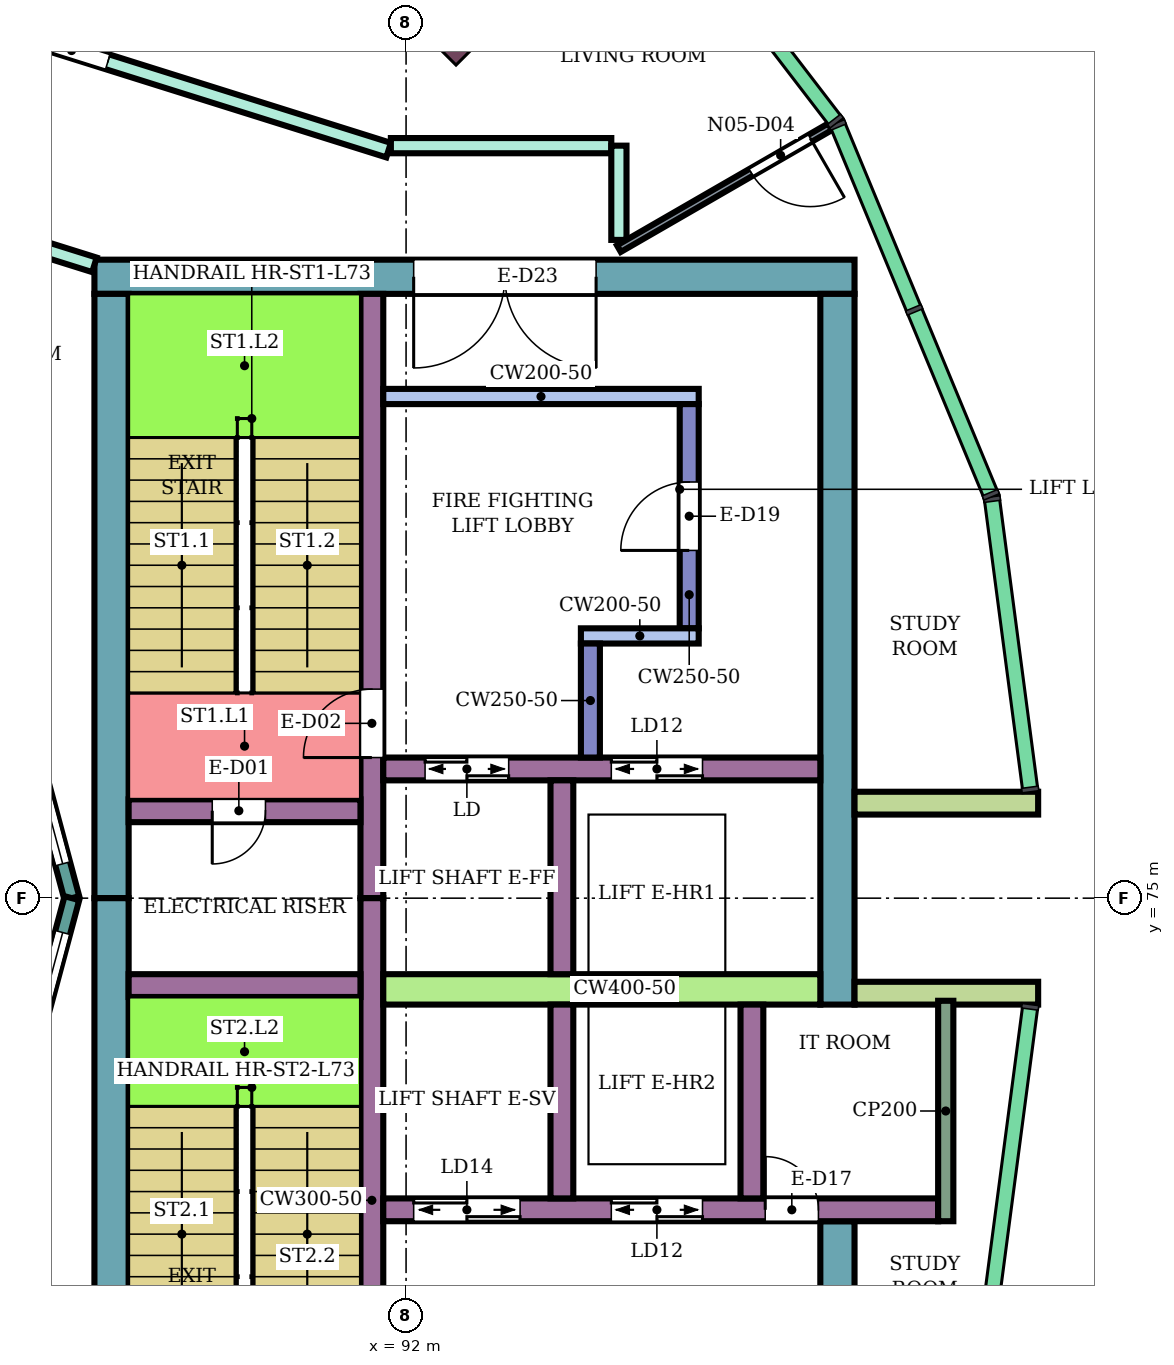
"""IFC4 building model, lengths in metres.
Left out: names, types, materials, properties, quantities, classifications, styles, units other than length and angle.
Written with IfcOpenShell. Run it as: python <this file> out.ifc"""

import sys

from ifc_helpers import new_model, si_unit, direction, frame, frame_2d, origin, origin_2d, place, context, subcontext, project, spatial, rectangle, extrude, element, fill, save


model = new_model("IFC4")
c1 = context("Model", 3, precision=1e-05, world=origin(), true_north=direction((0.0, 1.0)))
c2 = subcontext(c1, "Body", "Model", "MODEL_VIEW")
j1 = project(units=[si_unit("LENGTHUNIT", "METRE"), si_unit("PLANEANGLEUNIT", "RADIAN")], contexts=[c1])
p1 = place(None, origin())
s1 = spatial("IfcSite", under=j1, at=p1, CompositionType="ELEMENT")
p2 = place(p1, origin())
s2 = spatial("IfcBuilding", under=s1, at=p2, CompositionType="ELEMENT")
p3 = place(p2, frame((0.0, 0.0, 319.3)))
s3 = spatial("IfcBuildingStorey", under=s2, at=p3, CompositionType="ELEMENT", Elevation=319.3)
p4 = place(p3, frame((92.233, 87.233, 0.0), z_axis=(0.0, 0.0, 1.0), x_axis=(0.707106781187, 0.707106781187, 0.0)))
e1 = element("IfcColumn", 1, at=p4, inside=s3, PredefinedType="COLUMN", context=c2, shape_type="SweptSolid", body=[
    extrude(rectangle(XDim=1.2, YDim=2.4, at=origin_2d()), origin(), (0.0, 0.0, 1.0), 4.4),
])
p5 = place(p3, frame((87.9, 83.175, 0.0), z_axis=(0.0, 0.0, 1.0), x_axis=(1.0, 0.0, 0.0)))
e2 = element("IfcWall", 2, at=p5, inside=s3, PredefinedType="SHEAR", context=c2, shape_type="SweptSolid", body=[
    extrude(rectangle(XDim=10.0, YDim=0.45, at=frame_2d((5.0, 0.0))), origin(), (0.0, 0.0, 1.0), 4.08),
])
p6 = place(p5, frame((4.2, 0.0, 0.0)))
e3 = element("IfcOpeningElement", 3, at=p6, cuts=e2, PredefinedType="OPENING", context=c2, shape_type="SweptSolid", body=[
    extrude(rectangle(XDim=2.4, YDim=2.4, at=frame_2d((1.2, 1.2))), frame((0.0, 0.235, 0.0), z_axis=(0.0, -1.0, 0.0), x_axis=(1.0, 0.0, 0.0)), (0.0, 0.0, 1.0), 0.47),
])
for number, where, z_axis, x_axis in (
    (4, (88.125, 75.0, 0.0), (0.0, 0.0, 1.0), (0.0, 1.0, 0.0)),
    (5, (88.125, 67.05, 0.0), (0.0, 0.0, 1.0), (0.0, 1.0, 0.0)),
):
    element("IfcWall", number, at=place(p3, frame(where, z_axis=z_axis, x_axis=x_axis)), inside=s3, PredefinedType="SHEAR", context=c2, shape_type="SweptSolid", body=[
        extrude(rectangle(XDim=7.95, YDim=0.45, at=frame_2d((3.975, 0.0))), origin(), (0.0, 0.0, 1.0), 4.08),
    ])
p7 = place(p3, frame((97.675, 73.6, 0.0), z_axis=(0.0, 0.0, 1.0), x_axis=(0.0, 1.0, 0.0)))
e6 = element("IfcWall", 6, at=p7, inside=s3, PredefinedType="SHEAR", context=c2, shape_type="SweptSolid", body=[
    extrude(rectangle(XDim=9.35, YDim=0.45, at=frame_2d((4.675, 0.0))), origin(), (0.0, 0.0, 1.0), 4.08),
])
p8 = place(p3, frame((97.675, 67.05, 0.0), z_axis=(0.0, 0.0, 1.0), x_axis=(0.0, 1.0, 0.0)))
e7 = element("IfcWall", 7, at=p8, inside=s3, PredefinedType="SHEAR", context=c2, shape_type="SweptSolid", body=[
    extrude(rectangle(XDim=3.7, YDim=0.45, at=frame_2d((1.85, 0.0))), origin(), (0.0, 0.0, 1.0), 4.08),
])
p9 = place(p3, frame((91.55, 75.0, 0.0), z_axis=(0.0, 0.0, 1.0), x_axis=(0.0, 1.0, 0.0)))
e8 = element("IfcWall", 8, at=p9, inside=s3, PredefinedType="SHEAR", context=c2, shape_type="SweptSolid", body=[
    extrude(rectangle(XDim=7.95, YDim=0.3, at=frame_2d((3.975, 0.0))), origin(), (0.0, 0.0, 1.0), 4.08),
])
p10 = place(p9, frame((1.85, 0.0, 0.0)))
e9 = element("IfcOpeningElement", 9, at=p10, cuts=e8, PredefinedType="OPENING", context=c2, shape_type="SweptSolid", body=[
    extrude(rectangle(XDim=0.9, YDim=2.1, at=frame_2d((0.45, 1.05))), frame((0.0, 0.16, 0.0), z_axis=(0.0, -1.0, 0.0), x_axis=(1.0, 0.0, 0.0)), (0.0, 0.0, 1.0), 0.32),
])
p11 = place(p3, frame((91.55, 67.05, 0.0), z_axis=(0.0, 0.0, 1.0), x_axis=(0.0, 1.0, 0.0)))
e10 = element("IfcWall", 10, at=p11, inside=s3, PredefinedType="SHEAR", context=c2, shape_type="SweptSolid", body=[
    extrude(rectangle(XDim=7.95, YDim=0.3, at=frame_2d((3.975, 0.0))), origin(), (0.0, 0.0, 1.0), 4.08),
])
p12 = place(p11, frame((0.6, 0.0, 0.0)))
e11 = element("IfcOpeningElement", 11, at=p12, cuts=e10, PredefinedType="OPENING", context=c2, shape_type="SweptSolid", body=[
    extrude(rectangle(XDim=0.9, YDim=2.1, at=frame_2d((0.45, 1.05))), frame((0.0, 0.16, 0.0), z_axis=(0.0, -1.0, 0.0), x_axis=(1.0, 0.0, 0.0)), (0.0, 0.0, 1.0), 0.32),
])
p13 = place(p3, frame((88.35, 76.15, 0.0), z_axis=(0.0, 0.0, 1.0), x_axis=(1.0, 0.0, 0.0)))
e12 = element("IfcWall", 12, at=p13, inside=s3, PredefinedType="SHEAR", context=c2, shape_type="SweptSolid", body=[
    extrude(rectangle(XDim=3.05, YDim=0.3, at=frame_2d((1.525, 0.0))), origin(), (0.0, 0.0, 1.0), 4.08),
])
p14 = place(p13, frame((1.1, 0.0, 0.0)))
e13 = element("IfcOpeningElement", 13, at=p14, cuts=e12, PredefinedType="OPENING", context=c2, shape_type="SweptSolid", body=[
    extrude(rectangle(XDim=0.7, YDim=2.0, at=frame_2d((0.35, 1.0))), frame((0.0, 0.16, 0.0), z_axis=(0.0, -1.0, 0.0), x_axis=(1.0, 0.0, 0.0)), (0.0, 0.0, 1.0), 0.32),
])
p15 = place(p3, frame((88.35, 73.85, 0.0), z_axis=(0.0, 0.0, 1.0), x_axis=(1.0, 0.0, 0.0)))
e14 = element("IfcWall", 14, at=p15, inside=s3, PredefinedType="SHEAR", context=c2, shape_type="SweptSolid", body=[
    extrude(rectangle(XDim=3.05, YDim=0.3, at=frame_2d((1.525, 0.0))), origin(), (0.0, 0.0, 1.0), 4.08),
])
p16 = place(p3, frame((91.7, 76.7, 0.0), z_axis=(0.0, 0.0, 1.0), x_axis=(1.0, 0.0, 0.0)))
e15 = element("IfcWall", 15, at=p16, inside=s3, PredefinedType="SHEAR", context=c2, shape_type="SweptSolid", body=[
    extrude(rectangle(XDim=5.75, YDim=0.3, at=frame_2d((2.875, 0.0))), origin(), (0.0, 0.0, 1.0), 4.08),
])
p17 = place(p16, frame((0.55, 0.0, 0.0)))
e16 = element("IfcOpeningElement", 16, at=p17, cuts=e15, PredefinedType="OPENING", context=c2, shape_type="SweptSolid", body=[
    extrude(rectangle(XDim=1.1, YDim=2.1, at=frame_2d((0.55, 1.05))), frame((0.0, 0.16, 0.0), z_axis=(0.0, -1.0, 0.0), x_axis=(1.0, 0.0, 0.0)), (0.0, 0.0, 1.0), 0.32),
])
p18 = place(p16, frame((3.0, 0.0, 0.0)))
e17 = element("IfcOpeningElement", 17, at=p18, cuts=e15, PredefinedType="OPENING", context=c2, shape_type="SweptSolid", body=[
    extrude(rectangle(XDim=1.2, YDim=2.1, at=frame_2d((0.6, 1.05))), frame((0.0, 0.16, 0.0), z_axis=(0.0, -1.0, 0.0), x_axis=(1.0, 0.0, 0.0)), (0.0, 0.0, 1.0), 0.32),
])
p19 = place(p3, frame((91.7, 73.8, 0.0), z_axis=(0.0, 0.0, 1.0), x_axis=(1.0, 0.0, 0.0)))
e18 = element("IfcWall", 18, at=p19, inside=s3, PredefinedType="SHEAR", context=c2, shape_type="SweptSolid", body=[
    extrude(rectangle(XDim=5.75, YDim=0.4, at=frame_2d((2.875, 0.0))), origin(), (0.0, 0.0, 1.0), 4.08),
])
p20 = place(p3, frame((91.7, 70.9, 0.0), z_axis=(0.0, 0.0, 1.0), x_axis=(1.0, 0.0, 0.0)))
e19 = element("IfcWall", 19, at=p20, inside=s3, PredefinedType="SHEAR", context=c2, shape_type="SweptSolid", body=[
    extrude(rectangle(XDim=7.3, YDim=0.3, at=frame_2d((3.65, 0.0))), origin(), (0.0, 0.0, 1.0), 4.08),
])
p21 = place(p20, frame((0.4, 0.0, 0.0)))
e20 = element("IfcOpeningElement", 20, at=p21, cuts=e19, PredefinedType="OPENING", context=c2, shape_type="SweptSolid", body=[
    extrude(rectangle(XDim=1.4, YDim=2.1, at=frame_2d((0.7, 1.05))), frame((0.0, 0.16, 0.0), z_axis=(0.0, -1.0, 0.0), x_axis=(1.0, 0.0, 0.0)), (0.0, 0.0, 1.0), 0.32),
])
p22 = place(p20, frame((3.0, 0.0, 0.0)))
e21 = element("IfcOpeningElement", 21, at=p22, cuts=e19, PredefinedType="OPENING", context=c2, shape_type="SweptSolid", body=[
    extrude(rectangle(XDim=1.2, YDim=2.1, at=frame_2d((0.6, 1.05))), frame((0.0, 0.16, 0.0), z_axis=(0.0, -1.0, 0.0), x_axis=(1.0, 0.0, 0.0)), (0.0, 0.0, 1.0), 0.32),
])
p23 = place(p20, frame((5.025, 0.0, 0.0)))
e22 = element("IfcOpeningElement", 22, at=p23, cuts=e19, PredefinedType="OPENING", context=c2, shape_type="SweptSolid", body=[
    extrude(rectangle(XDim=0.7, YDim=2.1, at=frame_2d((0.35, 1.05))), frame((0.0, 0.16, 0.0), z_axis=(0.0, -1.0, 0.0), x_axis=(1.0, 0.0, 0.0)), (0.0, 0.0, 1.0), 0.32),
])
for number, where, z_axis, x_axis in (
    (23, (94.05, 74.0, 0.0), (0.0, 0.0, 1.0), (0.0, 1.0, 0.0)),
    (24, (94.05, 71.05, 0.0), (0.0, 0.0, 1.0), (0.0, 1.0, 0.0)),
    (25, (96.55, 71.05, 0.0), (0.0, 0.0, 1.0), (0.0, 1.0, 0.0)),
):
    element("IfcWall", number, at=place(p3, frame(where, z_axis=z_axis, x_axis=x_axis)), inside=s3, PredefinedType="SHEAR", context=c2, shape_type="SweptSolid", body=[
        extrude(rectangle(XDim=2.55, YDim=0.3, at=frame_2d((1.275, 0.0))), origin(), (0.0, 0.0, 1.0), 4.08),
    ])
p24 = place(p3, frame((91.7, 81.6, 0.0), z_axis=(0.0, 0.0, 1.0), x_axis=(1.0, 0.0, 0.0)))
e26 = element("IfcWall", 26, at=p24, inside=s3, PredefinedType="SHEAR", context=c2, shape_type="SweptSolid", body=[
    extrude(rectangle(XDim=4.15, YDim=0.2, at=frame_2d((2.075, 0.0))), origin(), (0.0, 0.0, 1.0), 4.08),
])
p25 = place(p3, frame((95.725, 78.55, 0.0), z_axis=(0.0, 0.0, 1.0), x_axis=(0.0, 1.0, 0.0)))
e27 = element("IfcWall", 27, at=p25, inside=s3, PredefinedType="SHEAR", context=c2, shape_type="SweptSolid", body=[
    extrude(rectangle(XDim=2.95, YDim=0.25, at=frame_2d((1.475, 0.0))), origin(), (0.0, 0.0, 1.0), 4.08),
])
p26 = place(p25, frame((1.025, 0.0, 0.0)))
e28 = element("IfcOpeningElement", 28, at=p26, cuts=e27, PredefinedType="OPENING", context=c2, shape_type="SweptSolid", body=[
    extrude(rectangle(XDim=0.9, YDim=2.1, at=frame_2d((0.45, 1.05))), frame((0.0, 0.135, 0.0), z_axis=(0.0, -1.0, 0.0), x_axis=(1.0, 0.0, 0.0)), (0.0, 0.0, 1.0), 0.27),
])
p27 = place(p3, frame((94.3, 78.45, 0.0), z_axis=(0.0, 0.0, 1.0), x_axis=(1.0, 0.0, 0.0)))
e29 = element("IfcWall", 29, at=p27, inside=s3, PredefinedType="SHEAR", context=c2, shape_type="SweptSolid", body=[
    extrude(rectangle(XDim=1.55, YDim=0.2, at=frame_2d((0.775, 0.0))), origin(), (0.0, 0.0, 1.0), 4.08),
])
p28 = place(p3, frame((94.425, 76.85, 0.0), z_axis=(0.0, 0.0, 1.0), x_axis=(0.0, 1.0, 0.0)))
e30 = element("IfcWall", 30, at=p28, inside=s3, PredefinedType="SHEAR", context=c2, shape_type="SweptSolid", body=[
    extrude(rectangle(XDim=1.5, YDim=0.25, at=frame_2d((0.75, 0.0))), origin(), (0.0, 0.0, 1.0), 4.08),
])
for number, where, z_axis, x_axis in (
    (31, (97.9, 73.75, 0.0), (0.0, 0.0, 1.0), (1.0, 0.0, 0.0)),
    (32, (97.9, 76.25, 0.0), (0.0, 0.0, 1.0), (1.0, 0.0, 0.0)),
):
    element("IfcWall", number, at=place(p3, frame(where, z_axis=z_axis, x_axis=x_axis)), inside=s3, PredefinedType="NOTDEFINED", context=c2, shape_type="SweptSolid", body=[
        extrude(rectangle(XDim=2.416, YDim=0.3, at=frame_2d((1.208, 0.0))), origin(), (0.0, 0.0, 1.0), 4.4),
    ])
p29 = place(p3, frame((87.604, 75.0, 0.0), z_axis=(0.0, 0.0, 1.0), x_axis=(-0.258789828301, 0.965933654434, 0.0)))
e33 = element("IfcWall", 33, at=p29, inside=s3, PredefinedType="NOTDEFINED", context=c2, shape_type="SweptSolid", body=[
    extrude(rectangle(XDim=3.936, YDim=0.2, at=frame_2d((1.968, 0.0))), origin(), (0.0, 0.0, 1.0), 4.4),
])
p30 = place(p29, frame((0.468, 0.0, 0.9)))
e34 = element("IfcOpeningElement", 34, at=p30, cuts=e33, PredefinedType="OPENING", context=c2, shape_type="SweptSolid", body=[
    extrude(rectangle(XDim=3.0, YDim=2.3, at=frame_2d((1.5, 1.15))), frame((0.0, 0.11, 0.0), z_axis=(0.0, -1.0, 0.0), x_axis=(1.0, 0.0, 0.0)), (0.0, 0.0, 1.0), 0.22),
])
p31 = place(p3, frame((86.585, 71.198, 0.0), z_axis=(0.0, 0.0, 1.0), x_axis=(0.258789828301, 0.965933654434, 0.0)))
e35 = element("IfcWall", 35, at=p31, inside=s3, PredefinedType="NOTDEFINED", context=c2, shape_type="SweptSolid", body=[
    extrude(rectangle(XDim=3.936, YDim=0.2, at=frame_2d((1.968, 0.0))), origin(), (0.0, 0.0, 1.0), 4.4),
])
p32 = place(p31, frame((0.468, 0.0, 0.9)))
e36 = element("IfcOpeningElement", 36, at=p32, cuts=e35, PredefinedType="OPENING", context=c2, shape_type="SweptSolid", body=[
    extrude(rectangle(XDim=3.0, YDim=2.3, at=frame_2d((1.5, 1.15))), frame((0.0, 0.11, 0.0), z_axis=(0.0, -1.0, 0.0), x_axis=(1.0, 0.0, 0.0)), (0.0, 0.0, 1.0), 0.22),
])
p33 = place(p3, frame((85.587, 84.057, 0.0), z_axis=(0.0, 0.0, 1.0), x_axis=(0.954239513179, -0.299043393987, 0.0)))
e37 = element("IfcWall", 37, at=p33, inside=s3, PredefinedType="PARTITIONING", context=c2, shape_type="SweptSolid", body=[
    extrude(rectangle(XDim=2.424, YDim=0.2, at=frame_2d((1.212, 0.0))), origin(), (0.0, 0.0, 1.0), 3.95),
])
p34 = place(p33, frame((0.762, 0.0, 0.0)))
e38 = element("IfcOpeningElement", 38, at=p34, cuts=e37, PredefinedType="OPENING", context=c2, shape_type="SweptSolid", body=[
    extrude(rectangle(XDim=0.9, YDim=2.1, at=frame_2d((0.45, 1.05))), frame((0.0, 0.11, 0.0), z_axis=(0.0, -1.0, 0.0), x_axis=(1.0, 0.0, 0.0)), (0.0, 0.0, 1.0), 0.22),
])
p35 = place(p3, frame((86.313, 86.555, 0.0), z_axis=(0.0, 0.0, 1.0), x_axis=(0.9540216201, -0.299737799389, 0.0)))
e39 = element("IfcWall", 39, at=p35, inside=s3, PredefinedType="PARTITIONING", context=c2, shape_type="SweptSolid", body=[
    extrude(rectangle(XDim=5.719, YDim=0.2, at=frame_2d((2.86, 0.0))), origin(), (0.0, 0.0, 1.0), 3.95),
])
p36 = place(p35, frame((0.848, 0.0, 0.0)))
e40 = element("IfcOpeningElement", 40, at=p36, cuts=e39, PredefinedType="OPENING", context=c2, shape_type="SweptSolid", body=[
    extrude(rectangle(XDim=1.0, YDim=2.1, at=frame_2d((0.5, 1.05))), frame((0.0, 0.11, 0.0), z_axis=(0.0, -1.0, 0.0), x_axis=(1.0, 0.0, 0.0)), (0.0, 0.0, 1.0), 0.22),
])
p37 = place(p3, frame((91.8, 84.9, 0.0), z_axis=(0.0, 0.0, 1.0), x_axis=(1.0, 0.0, 0.0)))
e41 = element("IfcWall", 41, at=p37, inside=s3, PredefinedType="PARTITIONING", context=c2, shape_type="SweptSolid", body=[
    extrude(rectangle(XDim=2.9, YDim=0.2, at=frame_2d((1.45, 0.0))), origin(), (0.0, 0.0, 1.0), 3.95),
])
p38 = place(p3, frame((94.8, 83.66, 0.0), z_axis=(0.0, 0.0, 1.0), x_axis=(0.0, 1.0, 0.0)))
e42 = element("IfcWall", 42, at=p38, inside=s3, PredefinedType="PARTITIONING", context=c2, shape_type="SweptSolid", body=[
    extrude(rectangle(XDim=1.24, YDim=0.2, at=frame_2d((0.62, 0.0))), origin(), (0.0, 0.0, 1.0), 3.95),
])
p39 = place(p3, frame((94.8, 83.545, 0.0), z_axis=(0.0, 0.0, 1.0), x_axis=(0.866141222235, 0.499799342882, 0.0)))
e43 = element("IfcWall", 43, at=p39, inside=s3, PredefinedType="PARTITIONING", context=c2, shape_type="SweptSolid", body=[
    extrude(rectangle(XDim=3.207, YDim=0.1, at=frame_2d((1.604, 0.0))), origin(), (0.0, 0.0, 1.0), 3.95),
])
p40 = place(p39, frame((2.007, 0.0, 0.0)))
e44 = element("IfcOpeningElement", 44, at=p40, cuts=e43, PredefinedType="OPENING", context=c2, shape_type="SweptSolid", body=[
    extrude(rectangle(XDim=0.9, YDim=2.1, at=frame_2d((0.45, 1.05))), frame((0.0, 0.06, 0.0), z_axis=(0.0, -1.0, 0.0), x_axis=(1.0, 0.0, 0.0)), (0.0, 0.0, 1.0), 0.12),
])
p41 = place(p3, frame((99.1, 70.75, 0.0), z_axis=(0.0, 0.0, 1.0), x_axis=(0.0, 1.0, 0.0)))
e45 = element("IfcWall", 45, at=p41, inside=s3, PredefinedType="PARTITIONING", context=c2, shape_type="SweptSolid", body=[
    extrude(rectangle(XDim=2.9, YDim=0.2, at=frame_2d((1.45, 0.0))), origin(), (0.0, 0.0, 1.0), 4.08),
])
p42 = place(p30, origin())
e46 = element("IfcWindow", 46, at=p42, inside=s3, PartitioningType="SINGLE_PANEL", PredefinedType="WINDOW", context=c2, shape_type="SweptSolid", body=[
    extrude(rectangle(XDim=3.0, YDim=2.3, at=frame_2d((1.5, 1.15))), frame((0.0, 0.03, 0.0), z_axis=(0.0, -1.0, 0.0), x_axis=(1.0, 0.0, 0.0)), (0.0, 0.0, 1.0), 0.06),
])
fill(e34, e46)
p43 = place(p32, origin())
e47 = element("IfcWindow", 47, at=p43, inside=s3, PartitioningType="SINGLE_PANEL", PredefinedType="WINDOW", context=c2, shape_type="SweptSolid", body=[
    extrude(rectangle(XDim=3.0, YDim=2.3, at=frame_2d((1.5, 1.15))), frame((0.0, 0.03, 0.0), z_axis=(0.0, -1.0, 0.0), x_axis=(1.0, 0.0, 0.0)), (0.0, 0.0, 1.0), 0.06),
])
fill(e36, e47)
p44 = place(p36, origin())
e48 = element("IfcDoor", 48, at=p44, inside=s3, OperationType="SINGLE_SWING_LEFT", PredefinedType="DOOR", context=c2, shape_type="SweptSolid", body=[
    extrude(rectangle(XDim=1.0, YDim=2.1, at=frame_2d((0.5, 1.05))), frame((0.0, 0.025, 0.0), z_axis=(0.0, -1.0, 0.0), x_axis=(1.0, 0.0, 0.0)), (0.0, 0.0, 1.0), 0.05),
])
fill(e40, e48)
p45 = place(p40, frame((0.9, 0.0, 0.0), z_axis=(0.0, 0.0, 1.0), x_axis=(-1.0, 0.0, 0.0)))
e49 = element("IfcDoor", 49, at=p45, inside=s3, OperationType="SINGLE_SWING_LEFT", PredefinedType="DOOR", context=c2, shape_type="SweptSolid", body=[
    extrude(rectangle(XDim=0.9, YDim=2.1, at=frame_2d((0.45, 1.05))), frame((0.0, 0.025, 0.0), z_axis=(0.0, -1.0, 0.0), x_axis=(1.0, 0.0, 0.0)), (0.0, 0.0, 1.0), 0.05),
])
fill(e44, e49)
p46 = place(p14, frame((0.7, 0.0, 0.0), z_axis=(0.0, 0.0, 1.0), x_axis=(-1.0, 0.0, 0.0)))
e50 = element("IfcDoor", 50, at=p46, inside=s3, OperationType="SINGLE_SWING_RIGHT", PredefinedType="DOOR", context=c2, shape_type="SweptSolid", body=[
    extrude(rectangle(XDim=0.7, YDim=2.0, at=frame_2d((0.35, 1.0))), frame((0.0, 0.025, 0.0), z_axis=(0.0, -1.0, 0.0), x_axis=(1.0, 0.0, 0.0)), (0.0, 0.0, 1.0), 0.05),
])
fill(e13, e50)
p47 = place(p10, origin())
e51 = element("IfcDoor", 51, at=p47, inside=s3, OperationType="SINGLE_SWING_LEFT", PredefinedType="DOOR", context=c2, shape_type="SweptSolid", body=[
    extrude(rectangle(XDim=0.9, YDim=2.1, at=frame_2d((0.45, 1.05))), frame((0.0, 0.025, 0.0), z_axis=(0.0, -1.0, 0.0), x_axis=(1.0, 0.0, 0.0)), (0.0, 0.0, 1.0), 0.05),
])
fill(e9, e51)
p48 = place(p17, origin())
e52 = element("IfcDoor", 52, at=p48, inside=s3, OperationType="DOUBLE_DOOR_SLIDING", PredefinedType="DOOR", context=c2, shape_type="SweptSolid", body=[
    extrude(rectangle(XDim=1.1, YDim=2.1, at=frame_2d((0.55, 1.05))), frame((0.0, 0.025, 0.0), z_axis=(0.0, -1.0, 0.0), x_axis=(1.0, 0.0, 0.0)), (0.0, 0.0, 1.0), 0.05),
])
fill(e16, e52)
p49 = place(p18, origin())
e53 = element("IfcDoor", 53, at=p49, inside=s3, OperationType="DOUBLE_DOOR_SLIDING", PredefinedType="DOOR", context=c2, shape_type="SweptSolid", body=[
    extrude(rectangle(XDim=1.2, YDim=2.1, at=frame_2d((0.6, 1.05))), frame((0.0, 0.025, 0.0), z_axis=(0.0, -1.0, 0.0), x_axis=(1.0, 0.0, 0.0)), (0.0, 0.0, 1.0), 0.05),
])
fill(e17, e53)
p50 = place(p21, origin())
e54 = element("IfcDoor", 54, at=p50, inside=s3, OperationType="DOUBLE_DOOR_SLIDING", PredefinedType="DOOR", context=c2, shape_type="SweptSolid", body=[
    extrude(rectangle(XDim=1.4, YDim=2.1, at=frame_2d((0.7, 1.05))), frame((0.0, 0.025, 0.0), z_axis=(0.0, -1.0, 0.0), x_axis=(1.0, 0.0, 0.0)), (0.0, 0.0, 1.0), 0.05),
])
fill(e20, e54)
p51 = place(p22, origin())
e55 = element("IfcDoor", 55, at=p51, inside=s3, OperationType="DOUBLE_DOOR_SLIDING", PredefinedType="DOOR", context=c2, shape_type="SweptSolid", body=[
    extrude(rectangle(XDim=1.2, YDim=2.1, at=frame_2d((0.6, 1.05))), frame((0.0, 0.025, 0.0), z_axis=(0.0, -1.0, 0.0), x_axis=(1.0, 0.0, 0.0)), (0.0, 0.0, 1.0), 0.05),
])
fill(e21, e55)
p52 = place(p23, origin())
e56 = element("IfcDoor", 56, at=p52, inside=s3, OperationType="SINGLE_SWING_LEFT", PredefinedType="DOOR", context=c2, shape_type="SweptSolid", body=[
    extrude(rectangle(XDim=0.7, YDim=2.1, at=frame_2d((0.35, 1.05))), frame((0.0, 0.025, 0.0), z_axis=(0.0, -1.0, 0.0), x_axis=(1.0, 0.0, 0.0)), (0.0, 0.0, 1.0), 0.05),
])
fill(e22, e56)
p53 = place(p26, origin())
e57 = element("IfcDoor", 57, at=p53, inside=s3, OperationType="SINGLE_SWING_LEFT", PredefinedType="DOOR", context=c2, shape_type="SweptSolid", body=[
    extrude(rectangle(XDim=0.9, YDim=2.1, at=frame_2d((0.45, 1.05))), frame((0.0, 0.025, 0.0), z_axis=(0.0, -1.0, 0.0), x_axis=(1.0, 0.0, 0.0)), (0.0, 0.0, 1.0), 0.05),
])
fill(e28, e57)
p54 = place(p6, frame((2.4, 0.0, 0.0), z_axis=(0.0, 0.0, 1.0), x_axis=(-1.0, 0.0, 0.0)))
e58 = element("IfcDoor", 58, at=p54, inside=s3, OperationType="DOUBLE_DOOR_SINGLE_SWING", PredefinedType="DOOR", context=c2, shape_type="SweptSolid", body=[
    extrude(rectangle(XDim=2.4, YDim=2.4, at=frame_2d((1.2, 1.2))), frame((0.0, 0.025, 0.0), z_axis=(0.0, -1.0, 0.0), x_axis=(1.0, 0.0, 0.0)), (0.0, 0.0, 1.0), 0.05),
])
fill(e3, e58)
save(model, sys.argv[1])
